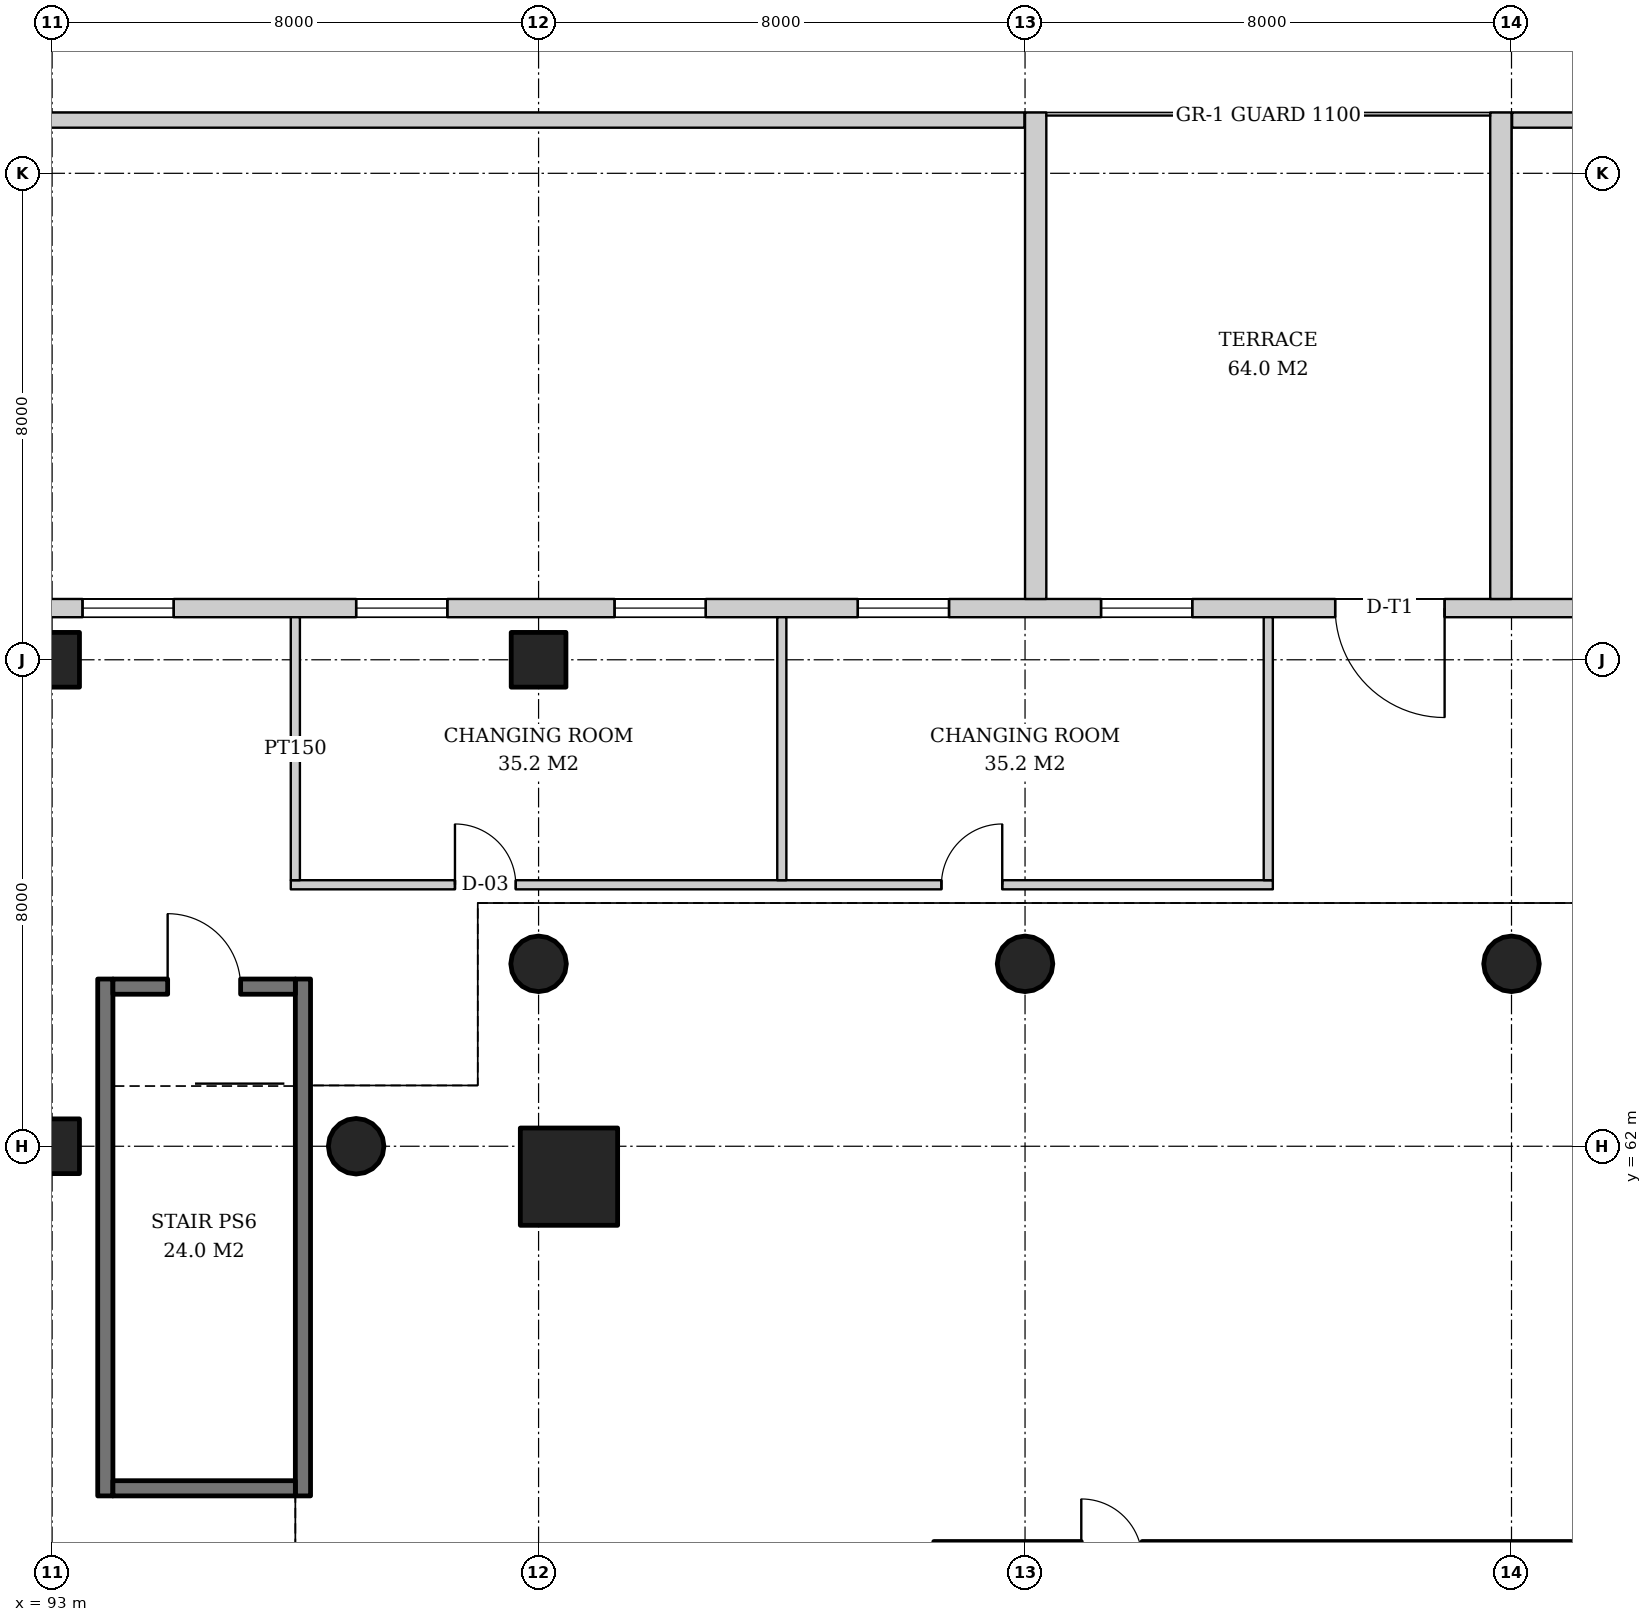
"""IFC4 building model, lengths in metres.
Left out: names, types, materials, properties, quantities, classifications, styles, units other than length and angle.
Written with IfcOpenShell. Run it as: python <this file> out.ifc"""

import sys

from ifc_helpers import new_model, si_unit, direction, frame, frame_2d, origin, origin_2d, place, context, subcontext, project, spatial, rectangle, hollow_circle, extrude, element, fill, save


model = new_model("IFC4")
c1 = context("Model", 3, precision=1e-05, world=origin(), true_north=direction((0.0, 1.0)))
c2 = subcontext(c1, "Body", "Model", "MODEL_VIEW")
j1 = project(units=[si_unit("LENGTHUNIT", "METRE"), si_unit("PLANEANGLEUNIT", "RADIAN")], contexts=[c1])
p1 = place(None, origin())
s1 = spatial("IfcSite", under=j1, at=p1, CompositionType="ELEMENT")
p2 = place(p1, origin())
s2 = spatial("IfcBuilding", under=s1, at=p2, CompositionType="ELEMENT")
p3 = place(p2, frame((0.0, 0.0, 16.0)))
s3 = spatial("IfcBuildingStorey", under=s2, at=p3, CompositionType="ELEMENT", Elevation=16.0)
for number, where, z_axis, x_axis in (
    (1, (93.0, 62.0, 0.0), (0.0, 0.0, 1.0), (1.0, 0.0, 0.0)),
    (2, (93.0, 70.0, 0.0), (0.0, 0.0, 1.0), (1.0, 0.0, 0.0)),
    (3, (101.0, 70.0, 0.0), (0.0, 0.0, 1.0), (1.0, 0.0, 0.0)),
):
    element("IfcColumn", number, at=place(p3, frame(where, z_axis=z_axis, x_axis=x_axis)), inside=s3, PredefinedType="COLUMN", context=c2, shape_type="SweptSolid", body=[
        extrude(rectangle(XDim=0.9, YDim=0.9, at=origin_2d()), origin(), (0.0, 0.0, 1.0), 5.0),
    ])
p4 = place(p3, frame((101.5, 61.5, 0.0), z_axis=(0.0, 0.0, 1.0), x_axis=(1.0, 0.0, 0.0)))
e4 = element("IfcColumn", 4, at=p4, inside=s3, PredefinedType="COLUMN", context=c2, shape_type="SweptSolid", body=[
    extrude(rectangle(XDim=1.6, YDim=1.6, at=origin_2d()), origin(), (0.0, 0.0, 1.0), 5.0),
])
for number, where, z_axis, x_axis in (
    (5, (101.0, 65.0, 0.0), (0.0, 0.0, 1.0), (1.0, 0.0, 0.0)),
    (6, (117.0, 65.0, 0.0), (0.0, 0.0, 1.0), (1.0, 0.0, 0.0)),
    (7, (109.0, 65.0, 0.0), (0.0, 0.0, 1.0), (1.0, 0.0, 0.0)),
    (8, (98.0, 62.0, 0.0), (0.0, 0.0, 1.0), (1.0, 0.0, 0.0)),
):
    element("IfcColumn", number, at=place(p3, frame(where, z_axis=z_axis, x_axis=x_axis)), inside=s3, PredefinedType="COLUMN", context=c2, shape_type="SweptSolid", body=[
        extrude(hollow_circle(Radius=0.457, WallThickness=0.03, at=origin_2d()), origin(), (0.0, 0.0, 1.0), 5.0),
    ])
p5 = place(p3, frame((142.0, 70.85, 0.0), z_axis=(0.0, 0.0, 1.0), x_axis=(-1.0, 0.0, 0.0)))
e9 = element("IfcWall", 9, at=p5, inside=s3, PredefinedType="SOLIDWALL", context=c2, shape_type="SweptSolid", body=[
    extrude(rectangle(XDim=50.0, YDim=0.3, at=frame_2d((25.0, 0.0))), origin(), (0.0, 0.0, 1.0), 4.7),
])
p6 = place(p5, frame((1.5, 0.0, 0.9)))
e10 = element("IfcOpeningElement", 10, at=p6, cuts=e9, PredefinedType="OPENING", context=c2, shape_type="SweptSolid", body=[
    extrude(rectangle(XDim=1.5, YDim=3.2, at=frame_2d((0.75, 1.6))), frame((0.0, 0.16, 0.0), z_axis=(0.0, -1.0, 0.0), x_axis=(1.0, 0.0, 0.0)), (0.0, 0.0, 1.0), 0.32),
])
p7 = place(p5, frame((6.0, 0.0, 0.9)))
e11 = element("IfcOpeningElement", 11, at=p7, cuts=e9, PredefinedType="OPENING", context=c2, shape_type="SweptSolid", body=[
    extrude(rectangle(XDim=1.5, YDim=3.2, at=frame_2d((0.75, 1.6))), frame((0.0, 0.16, 0.0), z_axis=(0.0, -1.0, 0.0), x_axis=(1.0, 0.0, 0.0)), (0.0, 0.0, 1.0), 0.32),
])
p8 = place(p5, frame((10.25, 0.0, 0.9)))
e12 = element("IfcOpeningElement", 12, at=p8, cuts=e9, PredefinedType="OPENING", context=c2, shape_type="SweptSolid", body=[
    extrude(rectangle(XDim=1.5, YDim=3.2, at=frame_2d((0.75, 1.6))), frame((0.0, 0.16, 0.0), z_axis=(0.0, -1.0, 0.0), x_axis=(1.0, 0.0, 0.0)), (0.0, 0.0, 1.0), 0.32),
])
p9 = place(p5, frame((14.25, 0.0, 0.9)))
e13 = element("IfcOpeningElement", 13, at=p9, cuts=e9, PredefinedType="OPENING", context=c2, shape_type="SweptSolid", body=[
    extrude(rectangle(XDim=1.5, YDim=3.2, at=frame_2d((0.75, 1.6))), frame((0.0, 0.16, 0.0), z_axis=(0.0, -1.0, 0.0), x_axis=(1.0, 0.0, 0.0)), (0.0, 0.0, 1.0), 0.32),
])
p10 = place(p5, frame((18.25, 0.0, 0.9)))
e14 = element("IfcOpeningElement", 14, at=p10, cuts=e9, PredefinedType="OPENING", context=c2, shape_type="SweptSolid", body=[
    extrude(rectangle(XDim=1.5, YDim=3.2, at=frame_2d((0.75, 1.6))), frame((0.0, 0.16, 0.0), z_axis=(0.0, -1.0, 0.0), x_axis=(1.0, 0.0, 0.0)), (0.0, 0.0, 1.0), 0.32),
])
p11 = place(p5, frame((22.25, 0.0, 0.9)))
e15 = element("IfcOpeningElement", 15, at=p11, cuts=e9, PredefinedType="OPENING", context=c2, shape_type="SweptSolid", body=[
    extrude(rectangle(XDim=1.5, YDim=3.2, at=frame_2d((0.75, 1.6))), frame((0.0, 0.16, 0.0), z_axis=(0.0, -1.0, 0.0), x_axis=(1.0, 0.0, 0.0)), (0.0, 0.0, 1.0), 0.32),
])
p12 = place(p5, frame((26.1, 0.0, 0.0)))
e16 = element("IfcOpeningElement", 16, at=p12, cuts=e9, PredefinedType="OPENING", context=c2, shape_type="SweptSolid", body=[
    extrude(rectangle(XDim=1.8, YDim=2.4, at=frame_2d((0.9, 1.2))), frame((0.0, 0.16, 0.0), z_axis=(0.0, -1.0, 0.0), x_axis=(1.0, 0.0, 0.0)), (0.0, 0.0, 1.0), 0.32),
])
p13 = place(p5, frame((30.25, 0.0, 0.9)))
e17 = element("IfcOpeningElement", 17, at=p13, cuts=e9, PredefinedType="OPENING", context=c2, shape_type="SweptSolid", body=[
    extrude(rectangle(XDim=1.5, YDim=3.2, at=frame_2d((0.75, 1.6))), frame((0.0, 0.16, 0.0), z_axis=(0.0, -1.0, 0.0), x_axis=(1.0, 0.0, 0.0)), (0.0, 0.0, 1.0), 0.32),
])
p14 = place(p5, frame((34.25, 0.0, 0.9)))
e18 = element("IfcOpeningElement", 18, at=p14, cuts=e9, PredefinedType="OPENING", context=c2, shape_type="SweptSolid", body=[
    extrude(rectangle(XDim=1.5, YDim=3.2, at=frame_2d((0.75, 1.6))), frame((0.0, 0.16, 0.0), z_axis=(0.0, -1.0, 0.0), x_axis=(1.0, 0.0, 0.0)), (0.0, 0.0, 1.0), 0.32),
])
p15 = place(p5, frame((38.25, 0.0, 0.9)))
e19 = element("IfcOpeningElement", 19, at=p15, cuts=e9, PredefinedType="OPENING", context=c2, shape_type="SweptSolid", body=[
    extrude(rectangle(XDim=1.5, YDim=3.2, at=frame_2d((0.75, 1.6))), frame((0.0, 0.16, 0.0), z_axis=(0.0, -1.0, 0.0), x_axis=(1.0, 0.0, 0.0)), (0.0, 0.0, 1.0), 0.32),
])
p16 = place(p5, frame((42.5, 0.0, 0.9)))
e20 = element("IfcOpeningElement", 20, at=p16, cuts=e9, PredefinedType="OPENING", context=c2, shape_type="SweptSolid", body=[
    extrude(rectangle(XDim=1.5, YDim=3.2, at=frame_2d((0.75, 1.6))), frame((0.0, 0.16, 0.0), z_axis=(0.0, -1.0, 0.0), x_axis=(1.0, 0.0, 0.0)), (0.0, 0.0, 1.0), 0.32),
])
p17 = place(p5, frame((47.0, 0.0, 0.9)))
e21 = element("IfcOpeningElement", 21, at=p17, cuts=e9, PredefinedType="OPENING", context=c2, shape_type="SweptSolid", body=[
    extrude(rectangle(XDim=1.5, YDim=3.2, at=frame_2d((0.75, 1.6))), frame((0.0, 0.16, 0.0), z_axis=(0.0, -1.0, 0.0), x_axis=(1.0, 0.0, 0.0)), (0.0, 0.0, 1.0), 0.32),
])
p18 = place(p3, frame((92.0, 78.875, 0.0), z_axis=(0.0, 0.0, 1.0), x_axis=(1.0, 0.0, 0.0)))
e22 = element("IfcWall", 22, at=p18, inside=s3, PredefinedType="PARAPET", context=c2, shape_type="SweptSolid", body=[
    extrude(rectangle(XDim=16.99, YDim=0.25, at=frame_2d((8.495, 0.0))), origin(), (0.0, 0.0, 1.0), 1.1),
])
p19 = place(p3, frame((117.01, 78.875, 0.0), z_axis=(0.0, 0.0, 1.0), x_axis=(1.0, 0.0, 0.0)))
e23 = element("IfcWall", 23, at=p19, inside=s3, PredefinedType="PARAPET", context=c2, shape_type="SweptSolid", body=[
    extrude(rectangle(XDim=24.99, YDim=0.25, at=frame_2d((12.495, 0.0))), origin(), (0.0, 0.0, 1.0), 1.1),
])
for number, where, z_axis, x_axis in (
    (24, (109.175, 71.0, 0.0), (0.0, 0.0, 1.0), (0.0, 1.0, 0.0)),
    (25, (116.825, 71.0, 0.0), (0.0, 0.0, 1.0), (0.0, 1.0, 0.0)),
):
    element("IfcWall", number, at=place(p3, frame(where, z_axis=z_axis, x_axis=x_axis)), inside=s3, PredefinedType="PARAPET", context=c2, shape_type="SweptSolid", body=[
        extrude(rectangle(XDim=8.0, YDim=0.35, at=frame_2d((4.0, 0.0))), origin(), (0.0, 0.0, 1.0), 1.1),
    ])
for number, where, z_axis, x_axis in (
    (26, (93.875, 56.25, 0.0), (0.0, 0.0, 1.0), (0.0, 1.0, 0.0)),
    (27, (97.125, 56.25, 0.0), (0.0, 0.0, 1.0), (0.0, 1.0, 0.0)),
):
    element("IfcWall", number, at=place(p3, frame(where, z_axis=z_axis, x_axis=x_axis)), inside=s3, PredefinedType="SOLIDWALL", context=c2, shape_type="SweptSolid", body=[
        extrude(rectangle(XDim=8.5, YDim=0.25, at=frame_2d((4.25, 0.0))), origin(), (0.0, 0.0, 1.0), 4.7),
    ])
p20 = place(p3, frame((94.0, 56.375, 0.0), z_axis=(0.0, 0.0, 1.0), x_axis=(1.0, 0.0, 0.0)))
e28 = element("IfcWall", 28, at=p20, inside=s3, PredefinedType="SOLIDWALL", context=c2, shape_type="SweptSolid", body=[
    extrude(rectangle(XDim=3.0, YDim=0.25, at=frame_2d((1.5, 0.0))), origin(), (0.0, 0.0, 1.0), 4.7),
])
p21 = place(p3, frame((94.0, 64.625, 0.0), z_axis=(0.0, 0.0, 1.0), x_axis=(1.0, 0.0, 0.0)))
e29 = element("IfcWall", 29, at=p21, inside=s3, PredefinedType="SOLIDWALL", context=c2, shape_type="SweptSolid", body=[
    extrude(rectangle(XDim=3.0, YDim=0.25, at=frame_2d((1.5, 0.0))), origin(), (0.0, 0.0, 1.0), 4.7),
])
p22 = place(p21, frame((0.9, 0.0, 0.0)))
e30 = element("IfcOpeningElement", 30, at=p22, cuts=e29, PredefinedType="OPENING", context=c2, shape_type="SweptSolid", body=[
    extrude(rectangle(XDim=1.2, YDim=2.1, at=frame_2d((0.6, 1.05))), frame((0.0, 0.135, 0.0), z_axis=(0.0, -1.0, 0.0), x_axis=(1.0, 0.0, 0.0)), (0.0, 0.0, 1.0), 0.27),
])
p23 = place(p3, frame((96.925, 66.3, 0.0), z_axis=(0.0, 0.0, 1.0), x_axis=(1.0, 0.0, 0.0)))
e31 = element("IfcWall", 31, at=p23, inside=s3, PredefinedType="PARTITIONING", context=c2, shape_type="SweptSolid", body=[
    extrude(rectangle(XDim=16.15, YDim=0.15, at=frame_2d((8.075, 0.0))), origin(), (0.0, 0.0, 1.0), 4.7),
])
p24 = place(p23, frame((2.7, 0.0, 0.0)))
e32 = element("IfcOpeningElement", 32, at=p24, cuts=e31, PredefinedType="OPENING", context=c2, shape_type="SweptSolid", body=[
    extrude(rectangle(XDim=1.0, YDim=2.1, at=frame_2d((0.5, 1.05))), frame((0.0, 0.085, 0.0), z_axis=(0.0, -1.0, 0.0), x_axis=(1.0, 0.0, 0.0)), (0.0, 0.0, 1.0), 0.17),
])
p25 = place(p23, frame((10.7, 0.0, 0.0)))
e33 = element("IfcOpeningElement", 33, at=p25, cuts=e31, PredefinedType="OPENING", context=c2, shape_type="SweptSolid", body=[
    extrude(rectangle(XDim=1.0, YDim=2.1, at=frame_2d((0.5, 1.05))), frame((0.0, 0.085, 0.0), z_axis=(0.0, -1.0, 0.0), x_axis=(1.0, 0.0, 0.0)), (0.0, 0.0, 1.0), 0.17),
])
for number, where, z_axis, x_axis in (
    (34, (97.0, 66.375, 0.0), (0.0, 0.0, 1.0), (0.0, 1.0, 0.0)),
    (35, (105.0, 66.375, 0.0), (0.0, 0.0, 1.0), (0.0, 1.0, 0.0)),
    (36, (113.0, 66.375, 0.0), (0.0, 0.0, 1.0), (0.0, 1.0, 0.0)),
):
    element("IfcWall", number, at=place(p3, frame(where, z_axis=z_axis, x_axis=x_axis)), inside=s3, PredefinedType="PARTITIONING", context=c2, shape_type="SweptSolid", body=[
        extrude(rectangle(XDim=4.325, YDim=0.15, at=frame_2d((2.163, 0.0))), origin(), (0.0, 0.0, 1.0), 4.7),
    ])
p26 = place(p12, origin())
e37 = element("IfcDoor", 37, at=p26, inside=s3, OperationType="DOUBLE_DOOR_SINGLE_SWING", PredefinedType="DOOR", context=c2, shape_type="SweptSolid", body=[
    extrude(rectangle(XDim=1.8, YDim=2.4, at=frame_2d((0.9, 1.2))), frame((0.0, 0.025, 0.0), z_axis=(0.0, -1.0, 0.0), x_axis=(1.0, 0.0, 0.0)), (0.0, 0.0, 1.0), 0.05),
])
fill(e16, e37)
p27 = place(p13, origin())
e38 = element("IfcWindow", 38, at=p27, inside=s3, PartitioningType="SINGLE_PANEL", PredefinedType="WINDOW", context=c2, shape_type="SweptSolid", body=[
    extrude(rectangle(XDim=1.5, YDim=3.2, at=frame_2d((0.75, 1.6))), frame((0.0, 0.03, 0.0), z_axis=(0.0, -1.0, 0.0), x_axis=(1.0, 0.0, 0.0)), (0.0, 0.0, 1.0), 0.06),
])
fill(e17, e38)
p28 = place(p14, origin())
e39 = element("IfcWindow", 39, at=p28, inside=s3, PartitioningType="SINGLE_PANEL", PredefinedType="WINDOW", context=c2, shape_type="SweptSolid", body=[
    extrude(rectangle(XDim=1.5, YDim=3.2, at=frame_2d((0.75, 1.6))), frame((0.0, 0.03, 0.0), z_axis=(0.0, -1.0, 0.0), x_axis=(1.0, 0.0, 0.0)), (0.0, 0.0, 1.0), 0.06),
])
fill(e18, e39)
p29 = place(p15, origin())
e40 = element("IfcWindow", 40, at=p29, inside=s3, PartitioningType="SINGLE_PANEL", PredefinedType="WINDOW", context=c2, shape_type="SweptSolid", body=[
    extrude(rectangle(XDim=1.5, YDim=3.2, at=frame_2d((0.75, 1.6))), frame((0.0, 0.03, 0.0), z_axis=(0.0, -1.0, 0.0), x_axis=(1.0, 0.0, 0.0)), (0.0, 0.0, 1.0), 0.06),
])
fill(e19, e40)
p30 = place(p16, origin())
e41 = element("IfcWindow", 41, at=p30, inside=s3, PartitioningType="SINGLE_PANEL", PredefinedType="WINDOW", context=c2, shape_type="SweptSolid", body=[
    extrude(rectangle(XDim=1.5, YDim=3.2, at=frame_2d((0.75, 1.6))), frame((0.0, 0.03, 0.0), z_axis=(0.0, -1.0, 0.0), x_axis=(1.0, 0.0, 0.0)), (0.0, 0.0, 1.0), 0.06),
])
fill(e20, e41)
p31 = place(p17, origin())
e42 = element("IfcWindow", 42, at=p31, inside=s3, PartitioningType="SINGLE_PANEL", PredefinedType="WINDOW", context=c2, shape_type="SweptSolid", body=[
    extrude(rectangle(XDim=1.5, YDim=3.2, at=frame_2d((0.75, 1.6))), frame((0.0, 0.03, 0.0), z_axis=(0.0, -1.0, 0.0), x_axis=(1.0, 0.0, 0.0)), (0.0, 0.0, 1.0), 0.06),
])
fill(e21, e42)
p32 = place(p22, origin())
e43 = element("IfcDoor", 43, at=p32, inside=s3, OperationType="SINGLE_SWING_LEFT", PredefinedType="DOOR", context=c2, shape_type="SweptSolid", body=[
    extrude(rectangle(XDim=1.2, YDim=2.1, at=frame_2d((0.6, 1.05))), frame((0.0, 0.025, 0.0), z_axis=(0.0, -1.0, 0.0), x_axis=(1.0, 0.0, 0.0)), (0.0, 0.0, 1.0), 0.05),
])
fill(e30, e43)
p33 = place(p24, origin())
e44 = element("IfcDoor", 44, at=p33, inside=s3, OperationType="SINGLE_SWING_LEFT", PredefinedType="DOOR", context=c2, shape_type="SweptSolid", body=[
    extrude(rectangle(XDim=1.0, YDim=2.1, at=frame_2d((0.5, 1.05))), frame((0.0, 0.025, 0.0), z_axis=(0.0, -1.0, 0.0), x_axis=(1.0, 0.0, 0.0)), (0.0, 0.0, 1.0), 0.05),
])
fill(e32, e44)
p34 = place(p25, origin())
e45 = element("IfcDoor", 45, at=p34, inside=s3, OperationType="SINGLE_SWING_RIGHT", PredefinedType="DOOR", context=c2, shape_type="SweptSolid", body=[
    extrude(rectangle(XDim=1.0, YDim=2.1, at=frame_2d((0.5, 1.05))), frame((0.0, 0.025, 0.0), z_axis=(0.0, -1.0, 0.0), x_axis=(1.0, 0.0, 0.0)), (0.0, 0.0, 1.0), 0.05),
])
fill(e33, e45)
save(model, sys.argv[1])
